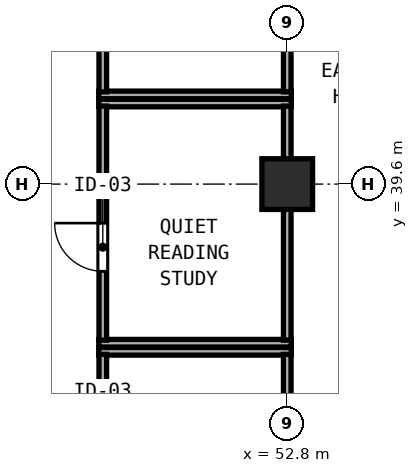
"""IFC4 building model, lengths in metres.
Left out: names, types, materials, properties, quantities, classifications, styles, units other than length and angle.
Written with IfcOpenShell. Run it as: python <this file> out.ifc"""

import sys

from ifc_helpers import new_model, si_unit, direction, frame, frame_2d, origin, origin_2d, place, context, subcontext, project, spatial, rectangle, hollow_rectangle, extrude, element, fill, save


model = new_model("IFC4")
c1 = context("Model", 3, precision=1e-05, world=origin(), true_north=direction((0.0, 1.0)))
c2 = subcontext(c1, "Body", "Model", "MODEL_VIEW")
j1 = project(units=[si_unit("LENGTHUNIT", "METRE"), si_unit("PLANEANGLEUNIT", "RADIAN")], contexts=[c1])
p1 = place(None, origin())
s1 = spatial("IfcSite", under=j1, at=p1, CompositionType="ELEMENT")
p2 = place(p1, origin())
s2 = spatial("IfcBuilding", under=s1, at=p2, CompositionType="ELEMENT")
p3 = place(p2, frame((0.0, 0.0, 81.8)))
s3 = spatial("IfcBuildingStorey", under=s2, at=p3, CompositionType="ELEMENT", Elevation=81.8)
p4 = place(p3, frame((52.8, 39.6, 0.0), z_axis=(0.0, 0.0, 1.0), x_axis=(1.0, 0.0, 0.0)))
e1 = element("IfcColumn", 1, at=p4, inside=s3, PredefinedType="COLUMN", context=c2, shape_type="SweptSolid", body=[
    extrude(hollow_rectangle(XDim=1.0, YDim=1.0, WallThickness=0.038, at=origin_2d()), origin(), (0.0, 0.0, 1.0), 3.8),
])
p5 = place(p3, frame((49.08, 36.3, 0.0), z_axis=(0.0, 0.0, 1.0), x_axis=(1.0, 0.0, 0.0)))
e2 = element("IfcWall", 2, at=p5, inside=s3, PredefinedType="PARTITIONING", context=c2, shape_type="SweptSolid", body=[
    extrude(rectangle(XDim=3.8, YDim=0.15, at=frame_2d((1.9, 0.0))), origin(), (0.0, 0.0, 1.0), 3.6),
])
p6 = place(p3, frame((49.16, 33.06, 0.0), z_axis=(0.0, 0.0, 1.0), x_axis=(0.0, 1.0, 0.0)))
e3 = element("IfcWall", 3, at=p6, inside=s3, PredefinedType="PARTITIONING", context=c2, shape_type="SweptSolid", body=[
    extrude(rectangle(XDim=3.18, YDim=0.15, at=frame_2d((1.59, 0.0))), origin(), (0.0, 0.0, 1.0), 3.6),
])
p7 = place(p6, frame((0.76, 0.0, 0.0)))
e4 = element("IfcOpeningElement", 4, at=p7, cuts=e3, PredefinedType="OPENING", context=c2, shape_type="SweptSolid", body=[
    extrude(rectangle(XDim=0.95, YDim=2.12, at=frame_2d((0.475, 1.06))), frame((0.0, 0.085, 0.0), z_axis=(0.0, -1.0, 0.0), x_axis=(1.0, 0.0, 0.0)), (0.0, 0.0, 1.0), 0.17),
])
p8 = place(p3, frame((52.8, 33.06, 0.0), z_axis=(0.0, 0.0, 1.0), x_axis=(0.0, 1.0, 0.0)))
e5 = element("IfcWall", 5, at=p8, inside=s3, PredefinedType="PARTITIONING", context=c2, shape_type="SweptSolid", body=[
    extrude(rectangle(XDim=3.18, YDim=0.15, at=frame_2d((1.59, 0.0))), origin(), (0.0, 0.0, 1.0), 3.097),
])
for number, where, z_axis, x_axis in (
    (6, (49.08, 41.2, 0.0), (0.0, 0.0, 1.0), (1.0, 0.0, 0.0)),
    (7, (49.08, 36.46, 0.0), (0.0, 0.0, 1.0), (1.0, 0.0, 0.0)),
):
    element("IfcWall", number, at=place(p3, frame(where, z_axis=z_axis, x_axis=x_axis)), inside=s3, PredefinedType="PARTITIONING", context=c2, shape_type="SweptSolid", body=[
        extrude(rectangle(XDim=3.8, YDim=0.15, at=frame_2d((1.9, 0.0))), origin(), (0.0, 0.0, 1.0), 3.6),
    ])
p9 = place(p3, frame((49.16, 36.52, 0.0), z_axis=(0.0, 0.0, 1.0), x_axis=(0.0, 1.0, 0.0)))
e8 = element("IfcWall", 8, at=p9, inside=s3, PredefinedType="PARTITIONING", context=c2, shape_type="SweptSolid", body=[
    extrude(rectangle(XDim=4.62, YDim=0.15, at=frame_2d((2.31, 0.0))), origin(), (0.0, 0.0, 1.0), 3.6),
])
p10 = place(p9, frame((1.36, 0.0, 0.0)))
e9 = element("IfcOpeningElement", 9, at=p10, cuts=e8, PredefinedType="OPENING", context=c2, shape_type="SweptSolid", body=[
    extrude(rectangle(XDim=0.95, YDim=2.12, at=frame_2d((0.475, 1.06))), frame((0.0, 0.085, 0.0), z_axis=(0.0, -1.0, 0.0), x_axis=(1.0, 0.0, 0.0)), (0.0, 0.0, 1.0), 0.17),
])
p11 = place(p3, frame((52.8, 36.52, 0.0), z_axis=(0.0, 0.0, 1.0), x_axis=(0.0, 1.0, 0.0)))
e10 = element("IfcWall", 10, at=p11, inside=s3, PredefinedType="PARTITIONING", context=c2, shape_type="SweptSolid", body=[
    extrude(rectangle(XDim=4.62, YDim=0.15, at=frame_2d((2.31, 0.0))), origin(), (0.0, 0.0, 1.0), 3.097),
])
p12 = place(p3, frame((49.08, 41.36, 0.0), z_axis=(0.0, 0.0, 1.0), x_axis=(1.0, 0.0, 0.0)))
e11 = element("IfcWall", 11, at=p12, inside=s3, PredefinedType="PARTITIONING", context=c2, shape_type="SweptSolid", body=[
    extrude(rectangle(XDim=3.8, YDim=0.15, at=frame_2d((1.9, 0.0))), origin(), (0.0, 0.0, 1.0), 3.6),
])
p13 = place(p3, frame((49.16, 41.42, 0.0), z_axis=(0.0, 0.0, 1.0), x_axis=(0.0, 1.0, 0.0)))
e12 = element("IfcWall", 12, at=p13, inside=s3, PredefinedType="PARTITIONING", context=c2, shape_type="SweptSolid", body=[
    extrude(rectangle(XDim=4.54, YDim=0.15, at=frame_2d((2.27, 0.0))), origin(), (0.0, 0.0, 1.0), 3.6),
])
p14 = place(p13, frame((1.16, 0.0, 0.0)))
e13 = element("IfcOpeningElement", 13, at=p14, cuts=e12, PredefinedType="OPENING", context=c2, shape_type="SweptSolid", body=[
    extrude(rectangle(XDim=0.95, YDim=2.12, at=frame_2d((0.475, 1.06))), frame((0.0, 0.085, 0.0), z_axis=(0.0, -1.0, 0.0), x_axis=(1.0, 0.0, 0.0)), (0.0, 0.0, 1.0), 0.17),
])
p15 = place(p3, frame((52.8, 41.42, 0.0), z_axis=(0.0, 0.0, 1.0), x_axis=(0.0, 1.0, 0.0)))
e14 = element("IfcWall", 14, at=p15, inside=s3, PredefinedType="PARTITIONING", context=c2, shape_type="SweptSolid", body=[
    extrude(rectangle(XDim=2.743, YDim=0.15, at=frame_2d((1.372, 0.0))), origin(), (0.0, 0.0, 1.0), 3.097),
])
p16 = place(p10, origin())
e15 = element("IfcDoor", 15, at=p16, inside=s3, OperationType="SINGLE_SWING_RIGHT", PredefinedType="DOOR", context=c2, shape_type="SweptSolid", body=[
    extrude(rectangle(XDim=0.95, YDim=2.12, at=frame_2d((0.475, 1.06))), frame((0.0, 0.025, 0.0), z_axis=(0.0, -1.0, 0.0), x_axis=(1.0, 0.0, 0.0)), (0.0, 0.0, 1.0), 0.05),
])
fill(e9, e15)
save(model, sys.argv[1])
